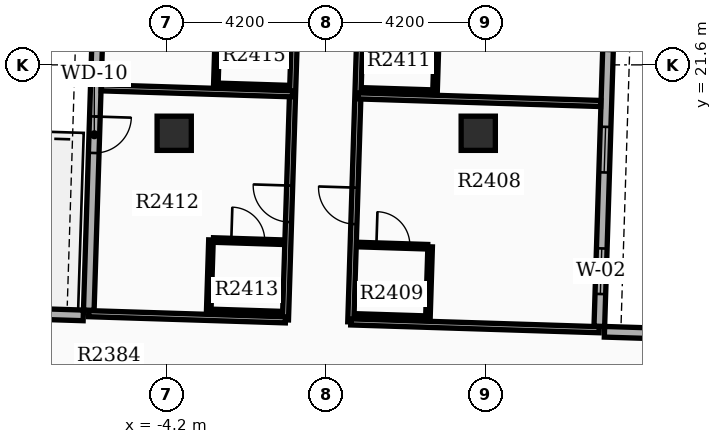
"""IFC4 building model, lengths in metres.
Left out: names, types, materials, properties, quantities, classifications, styles, units other than length and angle.
Written with IfcOpenShell. Run it as: python <this file> out.ifc"""

import sys

from ifc_helpers import new_model, si_unit, direction, frame, frame_2d, origin, origin_2d, place, context, subcontext, project, spatial, rectangle, extrude, element, fill, save


model = new_model("IFC4")
c1 = context("Model", 3, precision=1e-05, world=origin(), true_north=direction((0.0, 1.0)))
c2 = subcontext(c1, "Body", "Model", "MODEL_VIEW")
j1 = project(units=[si_unit("LENGTHUNIT", "METRE"), si_unit("PLANEANGLEUNIT", "RADIAN")], contexts=[c1])
p1 = place(None, origin())
s1 = spatial("IfcSite", under=j1, at=p1, CompositionType="ELEMENT")
p2 = place(p1, origin())
s2 = spatial("IfcBuilding", under=s1, at=p2, CompositionType="ELEMENT")
p3 = place(p2, frame((0.0, 0.0, 152.7)))
s3 = spatial("IfcBuildingStorey", under=s2, at=p3, CompositionType="ELEMENT", Elevation=152.7)
for number, where, z_axis, x_axis in (
    (1, (-4.0, 19.8, 0.0), (0.0, 0.0, 1.0), (1.0, 0.0, 0.0)),
    (2, (4.0, 19.8, 0.0), (0.0, 0.0, 1.0), (1.0, 0.0, 0.0)),
):
    element("IfcColumn", number, at=place(p3, frame(where, z_axis=z_axis, x_axis=x_axis)), inside=s3, PredefinedType="COLUMN", context=c2, shape_type="SweptSolid", body=[
        extrude(rectangle(XDim=0.9, YDim=0.9, at=origin_2d()), origin(), (0.0, 0.0, 1.0), 3.9),
    ])
p4 = place(p3, frame((7.186, 14.721, 0.0), z_axis=(0.0, 0.0, 1.0), x_axis=(0.031410322165, 0.999506574096, 0.0)))
e3 = element("IfcWall", 3, at=p4, inside=s3, PredefinedType="STANDARD", context=c2, shape_type="SweptSolid", body=[
    extrude(rectangle(XDim=20.1, YDim=0.28, at=frame_2d((10.05, 0.0))), origin(), (0.0, 0.0, 1.0), 2.97),
])
p5 = place(p4, frame((0.85, 0.0, 0.8)))
e4 = element("IfcOpeningElement", 4, at=p5, cuts=e3, PredefinedType="OPENING", context=c2, shape_type="SweptSolid", body=[
    extrude(rectangle(XDim=1.2, YDim=1.6, at=frame_2d((0.6, 0.8))), frame((0.0, 0.15, 0.0), z_axis=(0.0, -1.0, 0.0), x_axis=(1.0, 0.0, 0.0)), (0.0, 0.0, 1.0), 0.3),
])
p6 = place(p4, frame((4.05, 0.0, 0.8)))
e5 = element("IfcOpeningElement", 5, at=p6, cuts=e3, PredefinedType="OPENING", context=c2, shape_type="SweptSolid", body=[
    extrude(rectangle(XDim=1.2, YDim=1.6, at=frame_2d((0.6, 0.8))), frame((0.0, 0.15, 0.0), z_axis=(0.0, -1.0, 0.0), x_axis=(1.0, 0.0, 0.0)), (0.0, 0.0, 1.0), 0.3),
])
p7 = place(p4, frame((7.25, 0.0, 0.8)))
e6 = element("IfcOpeningElement", 6, at=p7, cuts=e3, PredefinedType="OPENING", context=c2, shape_type="SweptSolid", body=[
    extrude(rectangle(XDim=1.2, YDim=1.6, at=frame_2d((0.6, 0.8))), frame((0.0, 0.15, 0.0), z_axis=(0.0, -1.0, 0.0), x_axis=(1.0, 0.0, 0.0)), (0.0, 0.0, 1.0), 0.3),
])
p8 = place(p4, frame((10.45, 0.0, 0.8)))
e7 = element("IfcOpeningElement", 7, at=p8, cuts=e3, PredefinedType="OPENING", context=c2, shape_type="SweptSolid", body=[
    extrude(rectangle(XDim=1.2, YDim=1.6, at=frame_2d((0.6, 0.8))), frame((0.0, 0.15, 0.0), z_axis=(0.0, -1.0, 0.0), x_axis=(1.0, 0.0, 0.0)), (0.0, 0.0, 1.0), 0.3),
])
p9 = place(p3, frame((-5.616, 35.234, 0.0), z_axis=(0.0, 0.0, 1.0), x_axis=(-0.031398187845, -0.999506955354, 0.0)))
e8 = element("IfcWall", 8, at=p9, inside=s3, PredefinedType="STANDARD", context=c2, shape_type="SweptSolid", body=[
    extrude(rectangle(XDim=20.1, YDim=0.28, at=frame_2d((10.05, 0.0))), origin(), (0.0, 0.0, 1.0), 2.97),
])
p10 = place(p9, frame((0.85, 0.0, 0.8)))
e9 = element("IfcOpeningElement", 9, at=p10, cuts=e8, PredefinedType="OPENING", context=c2, shape_type="SweptSolid", body=[
    extrude(rectangle(XDim=1.2, YDim=1.6, at=frame_2d((0.6, 0.8))), frame((0.0, 0.15, 0.0), z_axis=(0.0, -1.0, 0.0), x_axis=(1.0, 0.0, 0.0)), (0.0, 0.0, 1.0), 0.3),
])
p11 = place(p9, frame((4.05, 0.0, 0.8)))
e10 = element("IfcOpeningElement", 10, at=p11, cuts=e8, PredefinedType="OPENING", context=c2, shape_type="SweptSolid", body=[
    extrude(rectangle(XDim=1.2, YDim=1.6, at=frame_2d((0.6, 0.8))), frame((0.0, 0.15, 0.0), z_axis=(0.0, -1.0, 0.0), x_axis=(1.0, 0.0, 0.0)), (0.0, 0.0, 1.0), 0.3),
])
p12 = place(p9, frame((7.25, 0.0, 0.8)))
e11 = element("IfcOpeningElement", 11, at=p12, cuts=e8, PredefinedType="OPENING", context=c2, shape_type="SweptSolid", body=[
    extrude(rectangle(XDim=1.2, YDim=1.6, at=frame_2d((0.6, 0.8))), frame((0.0, 0.15, 0.0), z_axis=(0.0, -1.0, 0.0), x_axis=(1.0, 0.0, 0.0)), (0.0, 0.0, 1.0), 0.3),
])
p13 = place(p9, frame((10.95, 0.0, 0.8)))
e12 = element("IfcOpeningElement", 12, at=p13, cuts=e8, PredefinedType="OPENING", context=c2, shape_type="SweptSolid", body=[
    extrude(rectangle(XDim=1.2, YDim=1.6, at=frame_2d((0.6, 0.8))), frame((0.0, 0.15, 0.0), z_axis=(0.0, -1.0, 0.0), x_axis=(1.0, 0.0, 0.0)), (0.0, 0.0, 1.0), 0.3),
])
p14 = place(p9, frame((15.0, 0.0, 0.0)))
e13 = element("IfcOpeningElement", 13, at=p14, cuts=e8, PredefinedType="OPENING", context=c2, shape_type="SweptSolid", body=[
    extrude(rectangle(XDim=0.96, YDim=2.1, at=frame_2d((0.48, 1.05))), frame((0.0, 0.15, 0.0), z_axis=(0.0, -1.0, 0.0), x_axis=(1.0, 0.0, 0.0)), (0.0, 0.0, 1.0), 0.3),
])
p15 = place(p3, frame((13.618, 14.379, 0.0), z_axis=(0.0, 0.0, 1.0), x_axis=(-0.999507224741, 0.031389611199, 0.0)))
e14 = element("IfcWall", 14, at=p15, inside=s3, PredefinedType="STANDARD", context=c2, shape_type="SweptSolid", body=[
    extrude(rectangle(XDim=6.3, YDim=0.28, at=frame_2d((3.15, 0.0))), origin(), (0.0, 0.0, 1.0), 2.97),
])
p16 = place(p3, frame((-12.689, 15.206, 0.0), z_axis=(0.0, 0.0, 1.0), x_axis=(0.999507262922, -0.031388395416, 0.0)))
e15 = element("IfcWall", 15, at=p16, inside=s3, PredefinedType="STANDARD", context=c2, shape_type="SweptSolid", body=[
    extrude(rectangle(XDim=6.3, YDim=0.28, at=frame_2d((3.15, 0.0))), origin(), (0.0, 0.0, 1.0), 2.97),
])
p17 = place(p3, frame((0.646, 14.837, 0.0), z_axis=(0.0, 0.0, 1.0), x_axis=(0.031385618091, 0.999507350137, 0.0)))
e16 = element("IfcWall", 16, at=p17, inside=s3, PredefinedType="PARTITIONING", context=c2, shape_type="SweptSolid", body=[
    extrude(rectangle(XDim=9.7, YDim=0.16, at=frame_2d((4.85, 0.0))), origin(), (0.0, 0.0, 1.0), 2.96),
])
p18 = place(p17, frame((2.575, 0.0, 0.0)))
e17 = element("IfcOpeningElement", 17, at=p18, cuts=e16, PredefinedType="OPENING", context=c2, shape_type="SweptSolid", body=[
    extrude(rectangle(XDim=0.96, YDim=2.15, at=frame_2d((0.48, 1.075))), frame((0.0, 0.09, 0.0), z_axis=(0.0, -1.0, 0.0), x_axis=(1.0, 0.0, 0.0)), (0.0, 0.0, 1.0), 0.18),
])
p19 = place(p17, frame((8.097, 0.0, 0.0)))
e18 = element("IfcOpeningElement", 18, at=p19, cuts=e16, PredefinedType="OPENING", context=c2, shape_type="SweptSolid", body=[
    extrude(rectangle(XDim=0.96, YDim=2.15, at=frame_2d((0.48, 1.075))), frame((0.0, 0.09, 0.0), z_axis=(0.0, -1.0, 0.0), x_axis=(1.0, 0.0, 0.0)), (0.0, 0.0, 1.0), 0.18),
])
p20 = place(p3, frame((0.646, 14.837, 0.0), z_axis=(0.0, 0.0, 1.0), x_axis=(0.999507037085, -0.031395585949, 0.0)))
e19 = element("IfcWall", 19, at=p20, inside=s3, PredefinedType="PARTITIONING", context=c2, shape_type="SweptSolid", body=[
    extrude(rectangle(XDim=6.54, YDim=0.16, at=frame_2d((3.27, 0.0))), origin(), (0.0, 0.0, 1.0), 2.96),
])
p21 = place(p3, frame((0.833, 20.784, 0.0), z_axis=(0.0, 0.0, 1.0), x_axis=(0.999505833379, -0.031433883636, 0.0)))
e20 = element("IfcWall", 20, at=p21, inside=s3, PredefinedType="PARTITIONING", context=c2, shape_type="SweptSolid", body=[
    extrude(rectangle(XDim=6.392, YDim=0.16, at=frame_2d((3.196, 0.0))), origin(), (0.0, 0.0, 1.0), 2.96),
])
p22 = place(p3, frame((0.85, 16.872, 0.0), z_axis=(0.0, 0.0, 1.0), x_axis=(0.999507221803, -0.031389704724, 0.0)))
e21 = element("IfcWall", 21, at=p22, inside=s3, PredefinedType="PARTITIONING", context=c2, shape_type="SweptSolid", body=[
    extrude(rectangle(XDim=1.82, YDim=0.12, at=frame_2d((0.91, 0.0))), origin(), (0.0, 0.0, 1.0), 2.96),
])
p23 = place(p22, frame((0.47, 0.0, 0.0)))
e22 = element("IfcOpeningElement", 22, at=p23, cuts=e21, PredefinedType="OPENING", context=c2, shape_type="SweptSolid", body=[
    extrude(rectangle(XDim=0.88, YDim=2.1, at=frame_2d((0.44, 1.05))), frame((0.0, 0.07, 0.0), z_axis=(0.0, -1.0, 0.0), x_axis=(1.0, 0.0, 0.0)), (0.0, 0.0, 1.0), 0.14),
])
p24 = place(p3, frame((0.791, 14.992, 0.0), z_axis=(0.0, 0.0, 1.0), x_axis=(0.999507221803, -0.031389704724, 0.0)))
e23 = element("IfcWall", 23, at=p24, inside=s3, PredefinedType="PARTITIONING", context=c2, shape_type="SweptSolid", body=[
    extrude(rectangle(XDim=1.82, YDim=0.12, at=frame_2d((0.91, 0.0))), origin(), (0.0, 0.0, 1.0), 2.96),
])
p25 = place(p3, frame((2.675, 14.933, 0.0), z_axis=(0.0, 0.0, 1.0), x_axis=(0.031425292588, 0.999506103526, 0.0)))
e24 = element("IfcWall", 24, at=p25, inside=s3, PredefinedType="PARTITIONING", context=c2, shape_type="SweptSolid", body=[
    extrude(rectangle(XDim=1.88, YDim=0.12, at=frame_2d((0.94, 0.0))), origin(), (0.0, 0.0, 1.0), 2.96),
])
p26 = place(p3, frame((0.978, 20.94, 0.0), z_axis=(0.0, 0.0, 1.0), x_axis=(0.999503004171, -0.03152371574, 0.0)))
e25 = element("IfcWall", 25, at=p26, inside=s3, PredefinedType="PARTITIONING", context=c2, shape_type="SweptSolid", body=[
    extrude(rectangle(XDim=1.82, YDim=0.12, at=frame_2d((0.91, 0.0))), origin(), (0.0, 0.0, 1.0), 2.96),
])
p27 = place(p3, frame((2.862, 20.88, 0.0), z_axis=(0.0, 0.0, 1.0), x_axis=(0.031434839006, 0.999505803333, 0.0)))
e26 = element("IfcWall", 26, at=p27, inside=s3, PredefinedType="PARTITIONING", context=c2, shape_type="SweptSolid", body=[
    extrude(rectangle(XDim=1.6, YDim=0.12, at=frame_2d((0.8, 0.0))), origin(), (0.0, 0.0, 1.0), 2.96),
])
p28 = place(p3, frame((-1.073, 14.891, 0.0), z_axis=(0.0, 0.0, 1.0), x_axis=(0.031411552371, 0.999506535435, 0.0)))
e27 = element("IfcWall", 27, at=p28, inside=s3, PredefinedType="PARTITIONING", context=c2, shape_type="SweptSolid", body=[
    extrude(rectangle(XDim=9.7, YDim=0.16, at=frame_2d((4.85, 0.0))), origin(), (0.0, 0.0, 1.0), 2.96),
])
p29 = place(p28, frame((2.575, 0.0, 0.0)))
e28 = element("IfcOpeningElement", 28, at=p29, cuts=e27, PredefinedType="OPENING", context=c2, shape_type="SweptSolid", body=[
    extrude(rectangle(XDim=0.96, YDim=2.15, at=frame_2d((0.48, 1.075))), frame((0.0, 0.09, 0.0), z_axis=(0.0, -1.0, 0.0), x_axis=(1.0, 0.0, 0.0)), (0.0, 0.0, 1.0), 0.18),
])
p30 = place(p28, frame((8.097, 0.0, 0.0)))
e29 = element("IfcOpeningElement", 29, at=p30, cuts=e27, PredefinedType="OPENING", context=c2, shape_type="SweptSolid", body=[
    extrude(rectangle(XDim=0.96, YDim=2.15, at=frame_2d((0.48, 1.075))), frame((0.0, 0.09, 0.0), z_axis=(0.0, -1.0, 0.0), x_axis=(1.0, 0.0, 0.0)), (0.0, 0.0, 1.0), 0.18),
])
p31 = place(p3, frame((-1.073, 14.891, 0.0), z_axis=(0.0, 0.0, 1.0), x_axis=(-0.999507236092, 0.03138924974, 0.0)))
e30 = element("IfcWall", 30, at=p31, inside=s3, PredefinedType="PARTITIONING", context=c2, shape_type="SweptSolid", body=[
    extrude(rectangle(XDim=5.18, YDim=0.16, at=frame_2d((2.59, 0.0))), origin(), (0.0, 0.0, 1.0), 2.96),
])
p32 = place(p3, frame((-0.886, 20.838, 0.0), z_axis=(0.0, 0.0, 1.0), x_axis=(-0.999507140691, 0.03139228738, 0.0)))
e31 = element("IfcWall", 31, at=p32, inside=s3, PredefinedType="PARTITIONING", context=c2, shape_type="SweptSolid", body=[
    extrude(rectangle(XDim=5.032, YDim=0.16, at=frame_2d((2.516, 0.0))), origin(), (0.0, 0.0, 1.0), 2.96),
])
p33 = place(p3, frame((-2.968, 16.992, 0.0), z_axis=(0.0, 0.0, 1.0), x_axis=(0.999503004171, -0.03152371574, 0.0)))
e32 = element("IfcWall", 32, at=p33, inside=s3, PredefinedType="PARTITIONING", context=c2, shape_type="SweptSolid", body=[
    extrude(rectangle(XDim=1.82, YDim=0.12, at=frame_2d((0.91, 0.0))), origin(), (0.0, 0.0, 1.0), 2.96),
])
p34 = place(p33, frame((0.47, 0.0, 0.0)))
e33 = element("IfcOpeningElement", 33, at=p34, cuts=e32, PredefinedType="OPENING", context=c2, shape_type="SweptSolid", body=[
    extrude(rectangle(XDim=0.88, YDim=2.1, at=frame_2d((0.44, 1.05))), frame((0.0, 0.07, 0.0), z_axis=(0.0, -1.0, 0.0), x_axis=(1.0, 0.0, 0.0)), (0.0, 0.0, 1.0), 0.14),
])
p35 = place(p3, frame((-3.027, 15.113, 0.0), z_axis=(0.0, 0.0, 1.0), x_axis=(0.999507221803, -0.031389704724, 0.0)))
e34 = element("IfcWall", 34, at=p35, inside=s3, PredefinedType="PARTITIONING", context=c2, shape_type="SweptSolid", body=[
    extrude(rectangle(XDim=1.82, YDim=0.12, at=frame_2d((0.91, 0.0))), origin(), (0.0, 0.0, 1.0), 2.96),
])
p36 = place(p3, frame((-3.092, 15.115, 0.0), z_axis=(0.0, 0.0, 1.0), x_axis=(0.031425292588, 0.999506103526, 0.0)))
e35 = element("IfcWall", 35, at=p36, inside=s3, PredefinedType="PARTITIONING", context=c2, shape_type="SweptSolid", body=[
    extrude(rectangle(XDim=1.88, YDim=0.12, at=frame_2d((0.94, 0.0))), origin(), (0.0, 0.0, 1.0), 2.96),
])
p37 = place(p3, frame((-2.84, 21.06, 0.0), z_axis=(0.0, 0.0, 1.0), x_axis=(0.999507221803, -0.031389704724, 0.0)))
e36 = element("IfcWall", 36, at=p37, inside=s3, PredefinedType="PARTITIONING", context=c2, shape_type="SweptSolid", body=[
    extrude(rectangle(XDim=1.82, YDim=0.12, at=frame_2d((0.91, 0.0))), origin(), (0.0, 0.0, 1.0), 2.96),
])
p38 = place(p3, frame((-2.905, 21.062, 0.0), z_axis=(0.0, 0.0, 1.0), x_axis=(0.031430045267, 0.999505954087, 0.0)))
e37 = element("IfcWall", 37, at=p38, inside=s3, PredefinedType="PARTITIONING", context=c2, shape_type="SweptSolid", body=[
    extrude(rectangle(XDim=1.6, YDim=0.12, at=frame_2d((0.8, 0.0))), origin(), (0.0, 0.0, 1.0), 2.96),
])
p39 = place(p5, origin())
e38 = element("IfcWindow", 38, at=p39, inside=s3, PartitioningType="SINGLE_PANEL", PredefinedType="WINDOW", context=c2, shape_type="SweptSolid", body=[
    extrude(rectangle(XDim=1.2, YDim=1.6, at=frame_2d((0.6, 0.8))), frame((0.0, 0.03, 0.0), z_axis=(0.0, -1.0, 0.0), x_axis=(1.0, 0.0, 0.0)), (0.0, 0.0, 1.0), 0.06),
])
fill(e4, e38)
p40 = place(p6, origin())
e39 = element("IfcWindow", 39, at=p40, inside=s3, PartitioningType="SINGLE_PANEL", PredefinedType="WINDOW", context=c2, shape_type="SweptSolid", body=[
    extrude(rectangle(XDim=1.2, YDim=1.6, at=frame_2d((0.6, 0.8))), frame((0.0, 0.03, 0.0), z_axis=(0.0, -1.0, 0.0), x_axis=(1.0, 0.0, 0.0)), (0.0, 0.0, 1.0), 0.06),
])
fill(e5, e39)
p41 = place(p14, origin())
e40 = element("IfcDoor", 40, at=p41, inside=s3, OperationType="SINGLE_SWING_LEFT", PredefinedType="DOOR", context=c2, shape_type="SweptSolid", body=[
    extrude(rectangle(XDim=0.96, YDim=2.1, at=frame_2d((0.48, 1.05))), frame((0.0, 0.025, 0.0), z_axis=(0.0, -1.0, 0.0), x_axis=(1.0, 0.0, 0.0)), (0.0, 0.0, 1.0), 0.05),
])
fill(e13, e40)
p42 = place(p18, origin())
e41 = element("IfcDoor", 41, at=p42, inside=s3, OperationType="SINGLE_SWING_RIGHT", PredefinedType="DOOR", context=c2, shape_type="SweptSolid", body=[
    extrude(rectangle(XDim=0.96, YDim=2.15, at=frame_2d((0.48, 1.075))), frame((0.0, 0.025, 0.0), z_axis=(0.0, -1.0, 0.0), x_axis=(1.0, 0.0, 0.0)), (0.0, 0.0, 1.0), 0.05),
])
fill(e17, e41)
p43 = place(p23, origin())
e42 = element("IfcDoor", 42, at=p43, inside=s3, OperationType="SINGLE_SWING_LEFT", PredefinedType="DOOR", context=c2, shape_type="SweptSolid", body=[
    extrude(rectangle(XDim=0.88, YDim=2.1, at=frame_2d((0.44, 1.05))), frame((0.0, 0.025, 0.0), z_axis=(0.0, -1.0, 0.0), x_axis=(1.0, 0.0, 0.0)), (0.0, 0.0, 1.0), 0.05),
])
fill(e22, e42)
p44 = place(p29, origin())
e43 = element("IfcDoor", 43, at=p44, inside=s3, OperationType="SINGLE_SWING_RIGHT", PredefinedType="DOOR", context=c2, shape_type="SweptSolid", body=[
    extrude(rectangle(XDim=0.96, YDim=2.15, at=frame_2d((0.48, 1.075))), frame((0.0, 0.025, 0.0), z_axis=(0.0, -1.0, 0.0), x_axis=(1.0, 0.0, 0.0)), (0.0, 0.0, 1.0), 0.05),
])
fill(e28, e43)
p45 = place(p34, origin())
e44 = element("IfcDoor", 44, at=p45, inside=s3, OperationType="SINGLE_SWING_LEFT", PredefinedType="DOOR", context=c2, shape_type="SweptSolid", body=[
    extrude(rectangle(XDim=0.88, YDim=2.1, at=frame_2d((0.44, 1.05))), frame((0.0, 0.025, 0.0), z_axis=(0.0, -1.0, 0.0), x_axis=(1.0, 0.0, 0.0)), (0.0, 0.0, 1.0), 0.05),
])
fill(e33, e44)
save(model, sys.argv[1])
